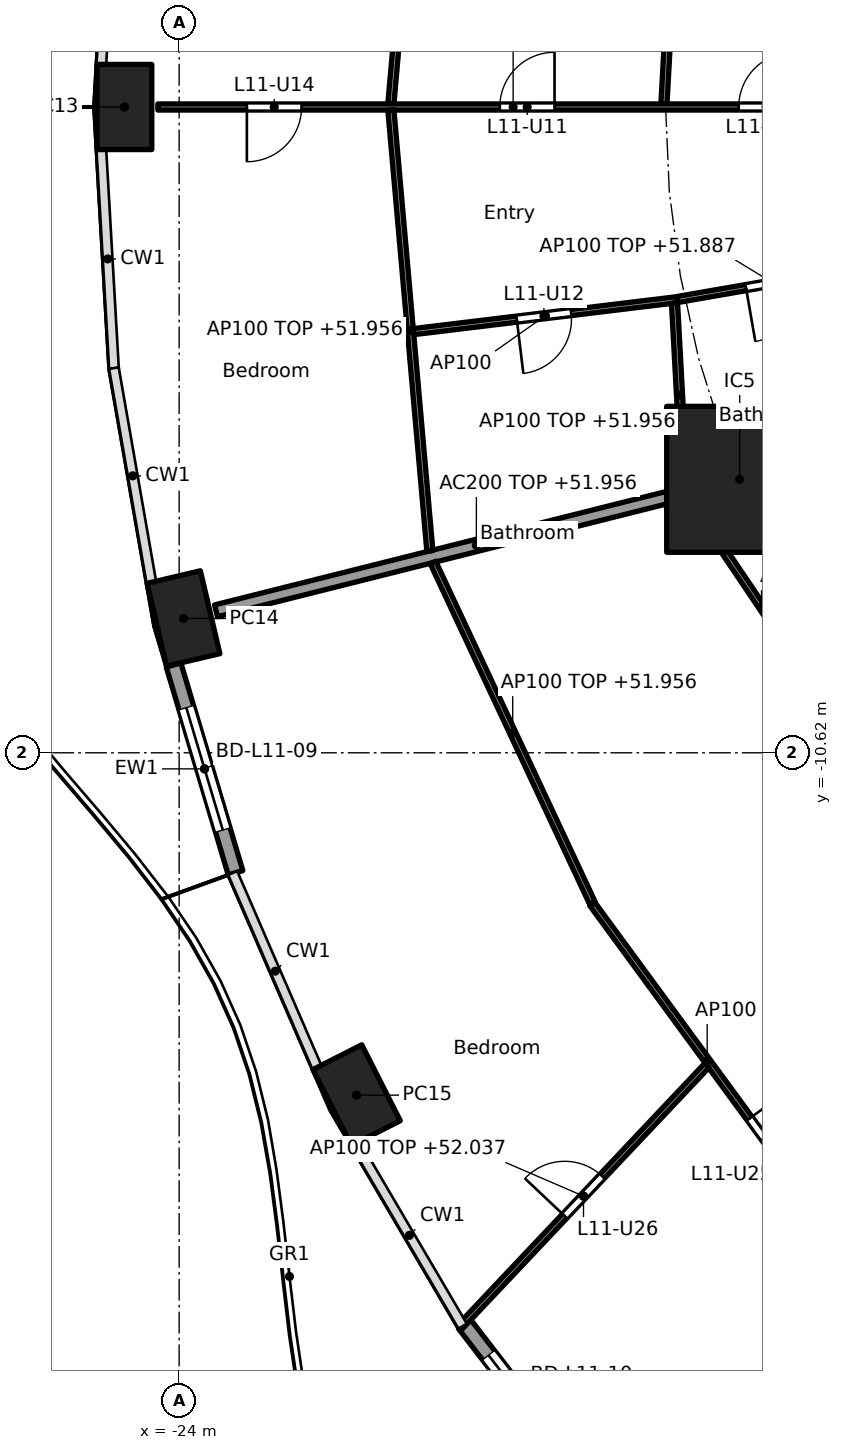
"""IFC4 building model, lengths in metres.
Left out: names, types, materials, properties, quantities, classifications, styles, units other than length and angle.
Written with IfcOpenShell. Run it as: python <this file> out.ifc"""

import sys

from ifc_helpers import new_model, si_unit, direction, frame, frame_2d, origin, origin_2d, place, context, subcontext, project, spatial, rectangle, hollow_rectangle, extrude, element, fill, save


model = new_model("IFC4")
c1 = context("Model", 3, precision=1e-05, world=origin(), true_north=direction((0.0, 1.0)))
c2 = subcontext(c1, "Body", "Model", "MODEL_VIEW")
j1 = project(units=[si_unit("LENGTHUNIT", "METRE"), si_unit("PLANEANGLEUNIT", "RADIAN")], contexts=[c1])
p1 = place(None, origin())
s1 = spatial("IfcSite", under=j1, at=p1, CompositionType="ELEMENT")
p2 = place(p1, origin())
s2 = spatial("IfcBuilding", under=s1, at=p2, CompositionType="ELEMENT")
p3 = place(p2, frame((0.0, 0.0, 49.2)))
s3 = spatial("IfcBuildingStorey", under=s2, at=p3, CompositionType="ELEMENT", Elevation=49.2)
for number, where, z_axis, x_axis in (
    (1, (-24.9, 0.0, 0.0), (0.0, 0.0, 1.0), (0.0, -1.0, 0.0)),
    (2, (-23.929, -8.412, 0.0), (0.0, 0.0, 1.0), (0.229, -0.973, 0.0)),
    (3, (-21.082, -16.25, 0.0), (0.0, 0.0, 1.0), (0.452, -0.892, 0.0)),
):
    element("IfcColumn", number, at=place(p3, frame(where, z_axis=z_axis, x_axis=x_axis)), inside=s3, PredefinedType="COLUMN", context=c2, shape_type="SweptSolid", body=[
        extrude(hollow_rectangle(XDim=1.4, YDim=0.9, WallThickness=0.05, at=origin_2d()), origin(), (0.0, 0.0, 1.0), 3.7),
    ])
p4 = place(p3, frame((-14.782, -6.123, 0.0), z_axis=(0.0, 0.0, 1.0), x_axis=(1.0, 0.0, 0.0)))
e4 = element("IfcColumn", 4, at=p4, inside=s3, PredefinedType="COLUMN", context=c2, shape_type="SweptSolid", body=[
    extrude(rectangle(XDim=2.4, YDim=2.4, at=origin_2d()), origin(), (0.0, 0.0, 1.0), 3.7),
])
p5 = place(p3, frame((-23.073, -12.593, 0.0), z_axis=(0.0, 0.0, 1.0), x_axis=(-0.285871309426, 0.958268018065, 0.0)))
e5 = element("IfcWall", 5, at=p5, inside=s3, PredefinedType="SOLIDWALL", context=c2, shape_type="SweptSolid", body=[
    extrude(rectangle(XDim=3.565, YDim=0.25, at=frame_2d((1.783, 0.0))), origin(), (0.0, 0.0, 1.0), 3.44),
])
p6 = place(p5, frame((0.733, 0.0, 0.0)))
e6 = element("IfcOpeningElement", 6, at=p6, cuts=e5, PredefinedType="OPENING", context=c2, shape_type="SweptSolid", body=[
    extrude(rectangle(XDim=2.1, YDim=2.4, at=frame_2d((1.05, 1.2))), frame((0.0, 0.135, 0.0), z_axis=(0.0, -1.0, 0.0), x_axis=(1.0, 0.0, 0.0)), (0.0, 0.0, 1.0), 0.27),
])
p7 = place(p3, frame((-17.234, -22.704, 0.0), z_axis=(0.0, 0.0, 1.0), x_axis=(-0.610457147657, 0.792049285635, 0.0)))
e7 = element("IfcWall", 7, at=p7, inside=s3, PredefinedType="SOLIDWALL", context=c2, shape_type="SweptSolid", body=[
    extrude(rectangle(XDim=3.397, YDim=0.25, at=frame_2d((1.699, 0.0))), origin(), (0.0, 0.0, 1.0), 3.44),
])
p8 = place(p7, frame((0.649, 0.0, 0.0)))
e8 = element("IfcOpeningElement", 8, at=p8, cuts=e7, PredefinedType="OPENING", context=c2, shape_type="SweptSolid", body=[
    extrude(rectangle(XDim=2.1, YDim=2.4, at=frame_2d((1.05, 1.2))), frame((0.0, 0.135, 0.0), z_axis=(0.0, -1.0, 0.0), x_axis=(1.0, 0.0, 0.0)), (0.0, 0.0, 1.0), 0.27),
])
p9 = place(p3, frame((-12.657, -5.243, 0.0), z_axis=(0.0, 0.0, 1.0), x_axis=(-0.923885664896, -0.382668627144, 0.0)))
e9 = element("IfcWall", 9, at=p9, inside=s3, PredefinedType="PARTITIONING", context=c2, shape_type="SweptSolid", body=[
    extrude(rectangle(XDim=2.2, YDim=0.2, at=frame_2d((1.1, 0.0))), origin(), (0.0, 0.0, 1.0), 3.44),
])
p10 = place(p3, frame((-14.831, -6.135, 0.0), z_axis=(0.0, 0.0, 1.0), x_axis=(-0.969884949569, -0.243563512454, 0.0)))
e10 = element("IfcWall", 10, at=p10, inside=s3, PredefinedType="PARTITIONING", context=c2, shape_type="SweptSolid", body=[
    extrude(rectangle(XDim=8.829, YDim=0.2, at=frame_2d((4.415, 0.0))), origin(), (0.0, 0.0, 1.0), 2.756),
])
p11 = place(p3, frame((-15.688, 6.249, 0.0), z_axis=(0.0, 0.0, 1.0), x_axis=(-0.054659814056, -0.998505034903, 0.0)))
e11 = element("IfcWall", 11, at=p11, inside=s3, PredefinedType="PARTITIONING", context=c2, shape_type="SweptSolid", body=[
    extrude(rectangle(XDim=6.208, YDim=0.1, at=frame_2d((3.104, 0.0))), origin(), (0.0, 0.0, 1.0), 2.756),
])
p12 = place(p3, frame((-19.877, 7.301, 0.0), z_axis=(0.0, 0.0, 1.0), x_axis=(-0.088143415068, -0.996107794558, 0.0)))
e12 = element("IfcWall", 12, at=p12, inside=s3, PredefinedType="PARTITIONING", context=c2, shape_type="SweptSolid", body=[
    extrude(rectangle(XDim=7.279, YDim=0.1, at=frame_2d((3.64, 0.0))), origin(), (0.0, 0.0, 1.0), 2.756),
])
p13 = place(p12, frame((3.189, 0.0, 0.0)))
e13 = element("IfcOpeningElement", 13, at=p13, cuts=e12, PredefinedType="OPENING", context=c2, shape_type="SweptSolid", body=[
    extrude(rectangle(XDim=0.9, YDim=2.1, at=frame_2d((0.45, 1.05))), frame((0.0, 0.06, 0.0), z_axis=(0.0, -1.0, 0.0), x_axis=(1.0, 0.0, 0.0)), (0.0, 0.0, 1.0), 0.12),
])
p14 = place(p3, frame((-12.665, 0.0, 0.0), z_axis=(0.0, 0.0, 1.0), x_axis=(-1.0, 0.0, 0.0)))
e14 = element("IfcWall", 14, at=p14, inside=s3, PredefinedType="PARTITIONING", context=c2, shape_type="SweptSolid", body=[
    extrude(rectangle(XDim=11.685, YDim=0.1, at=frame_2d((5.843, 0.0))), origin(), (0.0, 0.0, 1.0), 2.687),
])
p15 = place(p14, frame((1.233, 0.0, 0.0)))
e15 = element("IfcOpeningElement", 15, at=p15, cuts=e14, PredefinedType="OPENING", context=c2, shape_type="SweptSolid", body=[
    extrude(rectangle(XDim=0.9, YDim=2.1, at=frame_2d((0.45, 1.05))), frame((0.0, 0.06, 0.0), z_axis=(0.0, -1.0, 0.0), x_axis=(1.0, 0.0, 0.0)), (0.0, 0.0, 1.0), 0.12),
])
p16 = place(p14, frame((5.162, 0.0, 0.0)))
e16 = element("IfcOpeningElement", 16, at=p16, cuts=e14, PredefinedType="OPENING", context=c2, shape_type="SweptSolid", body=[
    extrude(rectangle(XDim=0.9, YDim=2.1, at=frame_2d((0.45, 1.05))), frame((0.0, 0.06, 0.0), z_axis=(0.0, -1.0, 0.0), x_axis=(1.0, 0.0, 0.0)), (0.0, 0.0, 1.0), 0.12),
])
p17 = place(p14, frame((9.322, 0.0, 0.0)))
e17 = element("IfcOpeningElement", 17, at=p17, cuts=e14, PredefinedType="OPENING", context=c2, shape_type="SweptSolid", body=[
    extrude(rectangle(XDim=0.9, YDim=2.1, at=frame_2d((0.45, 1.05))), frame((0.0, 0.06, 0.0), z_axis=(0.0, -1.0, 0.0), x_axis=(1.0, 0.0, 0.0)), (0.0, 0.0, 1.0), 0.12),
])
p18 = place(p3, frame((-20.518, -0.05, 0.0), z_axis=(0.0, 0.0, 1.0), x_axis=(0.088143415068, -0.996107794558, 0.0)))
e18 = element("IfcWall", 18, at=p18, inside=s3, PredefinedType="PARTITIONING", context=c2, shape_type="SweptSolid", body=[
    extrude(rectangle(XDim=7.279, YDim=0.1, at=frame_2d((3.64, 0.0))), origin(), (0.0, 0.0, 1.0), 2.756),
])
p19 = place(p3, frame((-12.663, -2.619, 0.0), z_axis=(0.0, 0.0, 1.0), x_axis=(-0.985220176102, -0.171292745325, 0.0)))
e19 = element("IfcWall", 19, at=p19, inside=s3, PredefinedType="PARTITIONING", context=c2, shape_type="SweptSolid", body=[
    extrude(rectangle(XDim=3.191, YDim=0.1, at=frame_2d((1.596, 0.0))), origin(), (0.0, 0.0, 1.0), 2.687),
])
p20 = place(p19, frame((1.146, 0.0, 0.0)))
e20 = element("IfcOpeningElement", 20, at=p20, cuts=e19, PredefinedType="OPENING", context=c2, shape_type="SweptSolid", body=[
    extrude(rectangle(XDim=0.9, YDim=2.1, at=frame_2d((0.45, 1.05))), frame((0.0, 0.06, 0.0), z_axis=(0.0, -1.0, 0.0), x_axis=(1.0, 0.0, 0.0)), (0.0, 0.0, 1.0), 0.12),
])
p21 = place(p3, frame((-15.807, -3.168, 0.0), z_axis=(0.0, 0.0, 1.0), x_axis=(-0.992741666002, -0.120266306938, 0.0)))
e21 = element("IfcWall", 21, at=p21, inside=s3, PredefinedType="PARTITIONING", context=c2, shape_type="SweptSolid", body=[
    extrude(rectangle(XDim=4.371, YDim=0.1, at=frame_2d((2.185, 0.0))), origin(), (0.0, 0.0, 1.0), 3.44),
])
p22 = place(p21, frame((1.76, 0.0, 0.0)))
e22 = element("IfcOpeningElement", 22, at=p22, cuts=e21, PredefinedType="OPENING", context=c2, shape_type="SweptSolid", body=[
    extrude(rectangle(XDim=0.9, YDim=2.1, at=frame_2d((0.45, 1.05))), frame((0.0, 0.06, 0.0), z_axis=(0.0, -1.0, 0.0), x_axis=(1.0, 0.0, 0.0)), (0.0, 0.0, 1.0), 0.12),
])
p23 = place(p3, frame((-15.854, -3.225, 0.0), z_axis=(0.0, 0.0, 1.0), x_axis=(0.054644199943, -0.998505889523, 0.0)))
e23 = element("IfcWall", 23, at=p23, inside=s3, PredefinedType="PARTITIONING", context=c2, shape_type="SweptSolid", body=[
    extrude(rectangle(XDim=3.029, YDim=0.1, at=frame_2d((1.515, 0.0))), origin(), (0.0, 0.0, 1.0), 2.756),
])
p24 = place(p3, frame((-15.627, -6.432, 0.0), z_axis=(0.0, 0.0, 1.0), x_axis=(0.559112679527, -0.829091678641, 0.0)))
e24 = element("IfcWall", 24, at=p24, inside=s3, PredefinedType="PARTITIONING", context=c2, shape_type="SweptSolid", body=[
    extrude(rectangle(XDim=4.308, YDim=0.1, at=frame_2d((2.154, 0.0))), origin(), (0.0, 0.0, 1.0), 3.44),
])
p25 = place(p3, frame((-19.826, -7.491, 0.0), z_axis=(0.0, 0.0, 1.0), x_axis=(0.423926333401, -0.905696673202, 0.0)))
e25 = element("IfcWall", 25, at=p25, inside=s3, PredefinedType="PARTITIONING", context=c2, shape_type="SweptSolid", body=[
    extrude(rectangle(XDim=6.188, YDim=0.1, at=frame_2d((3.094, 0.0))), origin(), (0.0, 0.0, 1.0), 2.756),
])
p26 = place(p3, frame((-17.211, -13.1, 0.0), z_axis=(0.0, 0.0, 1.0), x_axis=(0.591206785834, -0.806520016109, 0.0)))
e26 = element("IfcWall", 26, at=p26, inside=s3, PredefinedType="PARTITIONING", context=c2, shape_type="SweptSolid", body=[
    extrude(rectangle(XDim=6.41, YDim=0.1, at=frame_2d((3.205, 0.0))), origin(), (0.0, 0.0, 1.0), 2.756),
])
p27 = place(p26, frame((4.383, 0.0, 0.0)))
e27 = element("IfcOpeningElement", 27, at=p27, cuts=e26, PredefinedType="OPENING", context=c2, shape_type="SweptSolid", body=[
    extrude(rectangle(XDim=0.9, YDim=2.1, at=frame_2d((0.45, 1.05))), frame((0.0, 0.06, 0.0), z_axis=(0.0, -1.0, 0.0), x_axis=(1.0, 0.0, 0.0)), (0.0, 0.0, 1.0), 0.12),
])
p28 = place(p3, frame((-15.321, -15.761, 0.0), z_axis=(0.0, 0.0, 1.0), x_axis=(-0.686519245775, -0.727111631856, 0.0)))
e28 = element("IfcWall", 28, at=p28, inside=s3, PredefinedType="PARTITIONING", context=c2, shape_type="SweptSolid", body=[
    extrude(rectangle(XDim=5.912, YDim=0.1, at=frame_2d((2.956, 0.0))), origin(), (0.0, 0.0, 1.0), 2.837),
])
p29 = place(p28, frame((2.506, 0.0, 0.0)))
e29 = element("IfcOpeningElement", 29, at=p29, cuts=e28, PredefinedType="OPENING", context=c2, shape_type="SweptSolid", body=[
    extrude(rectangle(XDim=0.9, YDim=2.1, at=frame_2d((0.45, 1.05))), frame((0.0, 0.06, 0.0), z_axis=(0.0, -1.0, 0.0), x_axis=(1.0, 0.0, 0.0)), (0.0, 0.0, 1.0), 0.12),
])
p30 = place(p6, origin())
e30 = element("IfcDoor", 30, at=p30, inside=s3, OperationType="SLIDING_TO_LEFT", PredefinedType="DOOR", context=c2, shape_type="SweptSolid", body=[
    extrude(rectangle(XDim=2.1, YDim=2.4, at=frame_2d((1.05, 1.2))), frame((0.0, 0.025, 0.0), z_axis=(0.0, -1.0, 0.0), x_axis=(1.0, 0.0, 0.0)), (0.0, 0.0, 1.0), 0.05),
])
fill(e6, e30)
p31 = place(p8, origin())
e31 = element("IfcDoor", 31, at=p31, inside=s3, OperationType="SLIDING_TO_LEFT", PredefinedType="DOOR", context=c2, shape_type="SweptSolid", body=[
    extrude(rectangle(XDim=2.1, YDim=2.4, at=frame_2d((1.05, 1.2))), frame((0.0, 0.025, 0.0), z_axis=(0.0, -1.0, 0.0), x_axis=(1.0, 0.0, 0.0)), (0.0, 0.0, 1.0), 0.05),
])
fill(e8, e31)
p32 = place(p15, frame((0.9, 0.0, 0.0), x_axis=(-1.0, 0.0, 0.0)))
e32 = element("IfcDoor", 32, at=p32, inside=s3, OperationType="SINGLE_SWING_RIGHT", PredefinedType="DOOR", context=c2, shape_type="SweptSolid", body=[
    extrude(rectangle(XDim=0.9, YDim=2.1, at=frame_2d((0.45, 1.05))), frame((0.0, 0.025, 0.0), z_axis=(0.0, -1.0, 0.0), x_axis=(1.0, 0.0, 0.0)), (0.0, 0.0, 1.0), 0.05),
])
fill(e15, e32)
p33 = place(p20, origin())
e33 = element("IfcDoor", 33, at=p33, inside=s3, OperationType="SINGLE_SWING_RIGHT", PredefinedType="DOOR", context=c2, shape_type="SweptSolid", body=[
    extrude(rectangle(XDim=0.9, YDim=2.1, at=frame_2d((0.45, 1.05))), frame((0.0, 0.025, 0.0), z_axis=(0.0, -1.0, 0.0), x_axis=(1.0, 0.0, 0.0)), (0.0, 0.0, 1.0), 0.05),
])
fill(e20, e33)
p34 = place(p16, frame((0.9, 0.0, 0.0), x_axis=(-1.0, 0.0, 0.0)))
e34 = element("IfcDoor", 34, at=p34, inside=s3, OperationType="SINGLE_SWING_RIGHT", PredefinedType="DOOR", context=c2, shape_type="SweptSolid", body=[
    extrude(rectangle(XDim=0.9, YDim=2.1, at=frame_2d((0.45, 1.05))), frame((0.0, 0.025, 0.0), z_axis=(0.0, -1.0, 0.0), x_axis=(1.0, 0.0, 0.0)), (0.0, 0.0, 1.0), 0.05),
])
fill(e16, e34)
p35 = place(p22, origin())
e35 = element("IfcDoor", 35, at=p35, inside=s3, OperationType="SINGLE_SWING_RIGHT", PredefinedType="DOOR", context=c2, shape_type="SweptSolid", body=[
    extrude(rectangle(XDim=0.9, YDim=2.1, at=frame_2d((0.45, 1.05))), frame((0.0, 0.025, 0.0), z_axis=(0.0, -1.0, 0.0), x_axis=(1.0, 0.0, 0.0)), (0.0, 0.0, 1.0), 0.05),
])
fill(e22, e35)
p36 = place(p17, origin())
e36 = element("IfcDoor", 36, at=p36, inside=s3, OperationType="SINGLE_SWING_RIGHT", PredefinedType="DOOR", context=c2, shape_type="SweptSolid", body=[
    extrude(rectangle(XDim=0.9, YDim=2.1, at=frame_2d((0.45, 1.05))), frame((0.0, 0.025, 0.0), z_axis=(0.0, -1.0, 0.0), x_axis=(1.0, 0.0, 0.0)), (0.0, 0.0, 1.0), 0.05),
])
fill(e17, e36)
p37 = place(p27, origin())
e37 = element("IfcDoor", 37, at=p37, inside=s3, OperationType="SINGLE_SWING_LEFT", PredefinedType="DOOR", context=c2, shape_type="SweptSolid", body=[
    extrude(rectangle(XDim=0.9, YDim=2.1, at=frame_2d((0.45, 1.05))), frame((0.0, 0.025, 0.0), z_axis=(0.0, -1.0, 0.0), x_axis=(1.0, 0.0, 0.0)), (0.0, 0.0, 1.0), 0.05),
])
fill(e27, e37)
p38 = place(p29, frame((0.9, 0.0, 0.0), x_axis=(-1.0, 0.0, 0.0)))
e38 = element("IfcDoor", 38, at=p38, inside=s3, OperationType="SINGLE_SWING_LEFT", PredefinedType="DOOR", context=c2, shape_type="SweptSolid", body=[
    extrude(rectangle(XDim=0.9, YDim=2.1, at=frame_2d((0.45, 1.05))), frame((0.0, 0.025, 0.0), z_axis=(0.0, -1.0, 0.0), x_axis=(1.0, 0.0, 0.0)), (0.0, 0.0, 1.0), 0.05),
])
fill(e29, e38)
save(model, sys.argv[1])
